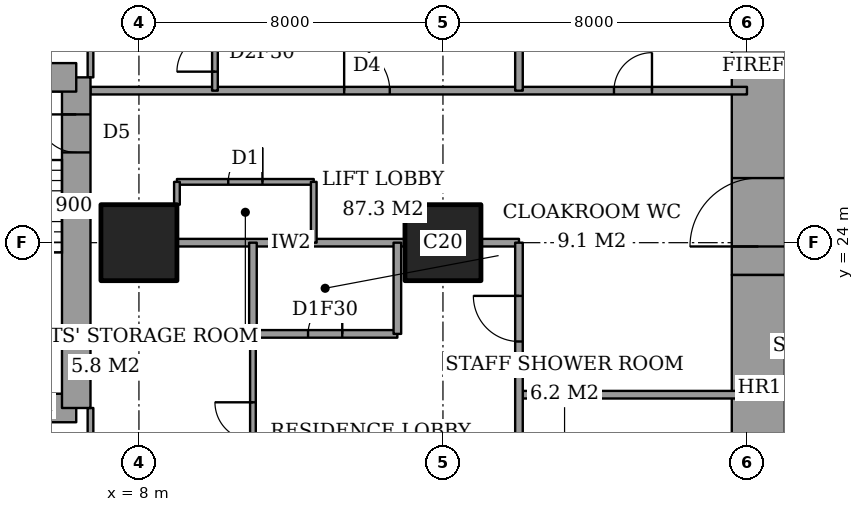
"""IFC4 building model, lengths in metres.
Left out: names, types, materials, properties, quantities, classifications, styles, units other than length and angle.
Written with IfcOpenShell. Run it as: python <this file> out.ifc"""

import sys

from ifc_helpers import new_model, si_unit, direction, frame, frame_2d, origin, origin_2d, place, context, subcontext, project, spatial, rectangle, extrude, element, fill, save


model = new_model("IFC4")
c1 = context("Model", 3, precision=1e-05, world=origin(), true_north=direction((0.0, 1.0)))
c2 = subcontext(c1, "Body", "Model", "MODEL_VIEW")
j1 = project(units=[si_unit("LENGTHUNIT", "METRE"), si_unit("PLANEANGLEUNIT", "RADIAN")], contexts=[c1])
p1 = place(None, origin())
s1 = spatial("IfcSite", under=j1, at=p1, CompositionType="ELEMENT")
p2 = place(p1, origin())
s2 = spatial("IfcBuilding", under=s1, at=p2, CompositionType="ELEMENT")
p3 = place(p2, frame((0.0, 0.0, 96.2)))
s3 = spatial("IfcBuildingStorey", under=s2, at=p3, CompositionType="ELEMENT", Elevation=96.2)
for number, where, z_axis, x_axis in (
    (1, (8.0, 24.0, 0.0), (0.0, 0.0, 1.0), (1.0, 0.0, 0.0)),
    (2, (16.0, 24.0, 0.0), (0.0, 0.0, 1.0), (1.0, 0.0, 0.0)),
):
    element("IfcColumn", number, at=place(p3, frame(where, z_axis=z_axis, x_axis=x_axis)), inside=s3, PredefinedType="COLUMN", context=c2, shape_type="SweptSolid", body=[
        extrude(rectangle(XDim=2.0, YDim=2.0, at=origin_2d()), origin(), (0.0, 0.0, 1.0), 3.6),
    ])
p4 = place(p3, frame((24.3, 13.0, 0.0), z_axis=(0.0, 0.0, 1.0), x_axis=(0.0, 1.0, 0.0)))
e3 = element("IfcWall", 3, at=p4, inside=s3, PredefinedType="SHEAR", context=c2, shape_type="SweptSolid", body=[
    extrude(rectangle(XDim=10.15, YDim=1.4, at=frame_2d((5.075, 0.0))), origin(), (0.0, 0.0, 1.0), 3.6),
])
p5 = place(p3, frame((24.3, 23.15, 0.0), z_axis=(0.0, 0.0, 1.0), x_axis=(0.0, 1.0, 0.0)))
e4 = element("IfcWall", 4, at=p5, inside=s3, PredefinedType="SHEAR", context=c2, shape_type="SweptSolid", body=[
    extrude(rectangle(XDim=11.85, YDim=1.4, at=frame_2d((5.925, 0.0))), origin(), (0.0, 0.0, 1.0), 3.6),
])
p6 = place(p5, frame((0.75, 0.0, 0.0)))
e5 = element("IfcOpeningElement", 5, at=p6, cuts=e4, PredefinedType="OPENING", context=c2, shape_type="SweptSolid", body=[
    extrude(rectangle(XDim=1.8, YDim=2.4, at=frame_2d((0.9, 1.2))), frame((0.0, 0.71, 0.0), z_axis=(0.0, -1.0, 0.0), x_axis=(1.0, 0.0, 0.0)), (0.0, 0.0, 1.0), 1.42),
])
p7 = place(p3, frame((1.9, 19.65, 0.0), z_axis=(0.0, 0.0, 1.0), x_axis=(1.0, 0.0, 0.0)))
e6 = element("IfcWall", 6, at=p7, inside=s3, PredefinedType="SHEAR", context=c2, shape_type="SweptSolid", body=[
    extrude(rectangle(XDim=4.45, YDim=0.75, at=frame_2d((2.225, 0.0))), origin(), (0.0, 0.0, 1.0), 3.6),
])
p8 = place(p3, frame((6.35, 19.65, 0.0), z_axis=(0.0, 0.0, 1.0), x_axis=(0.0, 1.0, 0.0)))
e7 = element("IfcWall", 7, at=p8, inside=s3, PredefinedType="SHEAR", context=c2, shape_type="SweptSolid", body=[
    extrude(rectangle(XDim=8.7, YDim=0.75, at=frame_2d((4.35, 0.0))), origin(), (0.0, 0.0, 1.0), 3.6),
])
p9 = place(p8, frame((6.725, 0.0, 0.0)))
e8 = element("IfcOpeningElement", 8, at=p9, cuts=e7, PredefinedType="OPENING", context=c2, shape_type="SweptSolid", body=[
    extrude(rectangle(XDim=1.0, YDim=2.1, at=frame_2d((0.5, 1.05))), frame((0.0, 0.385, 0.0), z_axis=(0.0, -1.0, 0.0), x_axis=(1.0, 0.0, 0.0)), (0.0, 0.0, 1.0), 0.77),
])
p10 = place(p3, frame((6.35, 28.35, 0.0), z_axis=(0.0, 0.0, 1.0), x_axis=(-1.0, 0.0, 0.0)))
e9 = element("IfcWall", 9, at=p10, inside=s3, PredefinedType="SHEAR", context=c2, shape_type="SweptSolid", body=[
    extrude(rectangle(XDim=4.45, YDim=0.75, at=frame_2d((2.225, 0.0))), origin(), (0.0, 0.0, 1.0), 3.6),
])
p11 = place(p3, frame((18.0, 20.0, 0.0), z_axis=(0.0, 0.0, 1.0), x_axis=(1.0, 0.0, 0.0)))
e10 = element("IfcWall", 10, at=p11, inside=s3, PredefinedType="PARTITIONING", context=c2, shape_type="SweptSolid", body=[
    extrude(rectangle(XDim=6.0, YDim=0.2, at=frame_2d((3.0, 0.0))), origin(), (0.0, 0.0, 1.0), 3.35),
])
p12 = place(p3, frame((11.0, 21.6, 0.0), z_axis=(0.0, 0.0, 1.0), x_axis=(1.0, 0.0, 0.0)))
e11 = element("IfcWall", 11, at=p12, inside=s3, PredefinedType="PARTITIONING", context=c2, shape_type="SweptSolid", body=[
    extrude(rectangle(XDim=3.8, YDim=0.2, at=frame_2d((1.9, 0.0))), origin(), (0.0, 0.0, 1.0), 3.35),
])
p13 = place(p12, frame((1.45, 0.0, 0.0)))
e12 = element("IfcOpeningElement", 12, at=p13, cuts=e11, PredefinedType="OPENING", context=c2, shape_type="SweptSolid", body=[
    extrude(rectangle(XDim=0.9, YDim=2.1, at=frame_2d((0.45, 1.05))), frame((0.0, 0.11, 0.0), z_axis=(0.0, -1.0, 0.0), x_axis=(1.0, 0.0, 0.0)), (0.0, 0.0, 1.0), 0.22),
])
p14 = place(p3, frame((9.0, 24.0, 0.0), z_axis=(0.0, 0.0, 1.0), x_axis=(1.0, 0.0, 0.0)))
e13 = element("IfcWall", 13, at=p14, inside=s3, PredefinedType="PARTITIONING", context=c2, shape_type="SweptSolid", body=[
    extrude(rectangle(XDim=6.0, YDim=0.2, at=frame_2d((3.0, 0.0))), origin(), (0.0, 0.0, 1.0), 3.35),
])
p15 = place(p3, frame((17.0, 24.0, 0.0), z_axis=(0.0, 0.0, 1.0), x_axis=(1.0, 0.0, 0.0)))
e14 = element("IfcWall", 14, at=p15, inside=s3, PredefinedType="PARTITIONING", context=c2, shape_type="SweptSolid", body=[
    extrude(rectangle(XDim=1.0, YDim=0.2, at=frame_2d((0.5, 0.0))), origin(), (0.0, 0.0, 1.0), 3.35),
])
p16 = place(p3, frame((9.0, 25.6, 0.0), z_axis=(0.0, 0.0, 1.0), x_axis=(1.0, 0.0, 0.0)))
e15 = element("IfcWall", 15, at=p16, inside=s3, PredefinedType="PARTITIONING", context=c2, shape_type="SweptSolid", body=[
    extrude(rectangle(XDim=3.6, YDim=0.15, at=frame_2d((1.8, 0.0))), origin(), (0.0, 0.0, 1.0), 3.35),
])
p17 = place(p16, frame((1.35, 0.0, 0.0)))
e16 = element("IfcOpeningElement", 16, at=p17, cuts=e15, PredefinedType="OPENING", context=c2, shape_type="SweptSolid", body=[
    extrude(rectangle(XDim=0.9, YDim=2.1, at=frame_2d((0.45, 1.05))), frame((0.0, 0.085, 0.0), z_axis=(0.0, -1.0, 0.0), x_axis=(1.0, 0.0, 0.0)), (0.0, 0.0, 1.0), 0.17),
])
p18 = place(p3, frame((6.725, 28.0, 0.0), z_axis=(0.0, 0.0, 1.0), x_axis=(1.0, 0.0, 0.0)))
e17 = element("IfcWall", 17, at=p18, inside=s3, PredefinedType="PARTITIONING", context=c2, shape_type="SweptSolid", body=[
    extrude(rectangle(XDim=17.275, YDim=0.2, at=frame_2d((8.637, 0.0))), origin(), (0.0, 0.0, 1.0), 3.35),
])
p19 = place(p18, frame((6.675, 0.0, 0.0)))
e18 = element("IfcOpeningElement", 18, at=p19, cuts=e17, PredefinedType="OPENING", context=c2, shape_type="SweptSolid", body=[
    extrude(rectangle(XDim=1.2, YDim=2.4, at=frame_2d((0.6, 1.2))), frame((0.0, 0.11, 0.0), z_axis=(0.0, -1.0, 0.0), x_axis=(1.0, 0.0, 0.0)), (0.0, 0.0, 1.0), 0.22),
])
p20 = place(p18, frame((13.775, 0.0, 0.0)))
e19 = element("IfcOpeningElement", 19, at=p20, cuts=e17, PredefinedType="OPENING", context=c2, shape_type="SweptSolid", body=[
    extrude(rectangle(XDim=1.0, YDim=2.1, at=frame_2d((0.5, 1.05))), frame((0.0, 0.11, 0.0), z_axis=(0.0, -1.0, 0.0), x_axis=(1.0, 0.0, 0.0)), (0.0, 0.0, 1.0), 0.22),
])
p21 = place(p3, frame((6.725, 17.2, 0.0), z_axis=(0.0, 0.0, 1.0), x_axis=(0.0, 1.0, 0.0)))
e20 = element("IfcWall", 20, at=p21, inside=s3, PredefinedType="PARTITIONING", context=c2, shape_type="SweptSolid", body=[
    extrude(rectangle(XDim=2.45, YDim=0.15, at=frame_2d((1.225, 0.0))), origin(), (0.0, 0.0, 1.0), 3.35),
])
p22 = place(p21, frame((0.587, 0.0, 0.0)))
e21 = element("IfcOpeningElement", 21, at=p22, cuts=e20, PredefinedType="OPENING", context=c2, shape_type="SweptSolid", body=[
    extrude(rectangle(XDim=0.9, YDim=2.1, at=frame_2d((0.45, 1.05))), frame((0.0, 0.085, 0.0), z_axis=(0.0, -1.0, 0.0), x_axis=(1.0, 0.0, 0.0)), (0.0, 0.0, 1.0), 0.17),
])
p23 = place(p3, frame((6.725, 28.35, 0.0), z_axis=(0.0, 0.0, 1.0), x_axis=(0.0, 1.0, 0.0)))
e22 = element("IfcWall", 22, at=p23, inside=s3, PredefinedType="PARTITIONING", context=c2, shape_type="SweptSolid", body=[
    extrude(rectangle(XDim=2.45, YDim=0.15, at=frame_2d((1.225, 0.0))), origin(), (0.0, 0.0, 1.0), 3.35),
])
p24 = place(p23, frame((0.913, 0.0, 0.0)))
e23 = element("IfcOpeningElement", 23, at=p24, cuts=e22, PredefinedType="OPENING", context=c2, shape_type="SweptSolid", body=[
    extrude(rectangle(XDim=1.0, YDim=2.1, at=frame_2d((0.5, 1.05))), frame((0.0, 0.085, 0.0), z_axis=(0.0, -1.0, 0.0), x_axis=(1.0, 0.0, 0.0)), (0.0, 0.0, 1.0), 0.17),
])
p25 = place(p3, frame((9.0, 25.0, 0.0), z_axis=(0.0, 0.0, 1.0), x_axis=(0.0, 1.0, 0.0)))
e24 = element("IfcWall", 24, at=p25, inside=s3, PredefinedType="PARTITIONING", context=c2, shape_type="SweptSolid", body=[
    extrude(rectangle(XDim=0.6, YDim=0.15, at=frame_2d((0.3, 0.0))), origin(), (0.0, 0.0, 1.0), 3.35),
])
p26 = place(p3, frame((10.0, 28.0, 0.0), z_axis=(0.0, 0.0, 1.0), x_axis=(0.0, 1.0, 0.0)))
e25 = element("IfcWall", 25, at=p26, inside=s3, PredefinedType="PARTITIONING", context=c2, shape_type="SweptSolid", body=[
    extrude(rectangle(XDim=9.4, YDim=0.15, at=frame_2d((4.7, 0.0))), origin(), (0.0, 0.0, 1.0), 3.35),
])
p27 = place(p26, frame((0.5, 0.0, 0.0)))
e26 = element("IfcOpeningElement", 26, at=p27, cuts=e25, PredefinedType="OPENING", context=c2, shape_type="SweptSolid", body=[
    extrude(rectangle(XDim=1.0, YDim=2.1, at=frame_2d((0.5, 1.05))), frame((0.0, 0.085, 0.0), z_axis=(0.0, -1.0, 0.0), x_axis=(1.0, 0.0, 0.0)), (0.0, 0.0, 1.0), 0.17),
])
p28 = place(p3, frame((11.0, 21.6, 0.0), z_axis=(0.0, 0.0, 1.0), x_axis=(0.0, 1.0, 0.0)))
e27 = element("IfcWall", 27, at=p28, inside=s3, PredefinedType="PARTITIONING", context=c2, shape_type="SweptSolid", body=[
    extrude(rectangle(XDim=2.4, YDim=0.2, at=frame_2d((1.2, 0.0))), origin(), (0.0, 0.0, 1.0), 3.35),
])
p29 = place(p3, frame((11.0, 10.8, 0.0), z_axis=(0.0, 0.0, 1.0), x_axis=(0.0, 1.0, 0.0)))
e28 = element("IfcWall", 28, at=p29, inside=s3, PredefinedType="PARTITIONING", context=c2, shape_type="SweptSolid", body=[
    extrude(rectangle(XDim=10.8, YDim=0.15, at=frame_2d((5.4, 0.0))), origin(), (0.0, 0.0, 1.0), 3.35),
])
p30 = place(p29, frame((8.0, 0.0, 0.0)))
e29 = element("IfcOpeningElement", 29, at=p30, cuts=e28, PredefinedType="OPENING", context=c2, shape_type="SweptSolid", body=[
    extrude(rectangle(XDim=1.0, YDim=2.1, at=frame_2d((0.5, 1.05))), frame((0.0, 0.085, 0.0), z_axis=(0.0, -1.0, 0.0), x_axis=(1.0, 0.0, 0.0)), (0.0, 0.0, 1.0), 0.17),
])
p31 = place(p3, frame((12.6, 24.0, 0.0), z_axis=(0.0, 0.0, 1.0), x_axis=(0.0, 1.0, 0.0)))
e30 = element("IfcWall", 30, at=p31, inside=s3, PredefinedType="PARTITIONING", context=c2, shape_type="SweptSolid", body=[
    extrude(rectangle(XDim=1.6, YDim=0.15, at=frame_2d((0.8, 0.0))), origin(), (0.0, 0.0, 1.0), 3.35),
])
p32 = place(p3, frame((14.8, 21.6, 0.0), z_axis=(0.0, 0.0, 1.0), x_axis=(0.0, 1.0, 0.0)))
e31 = element("IfcWall", 31, at=p32, inside=s3, PredefinedType="PARTITIONING", context=c2, shape_type="SweptSolid", body=[
    extrude(rectangle(XDim=2.4, YDim=0.2, at=frame_2d((1.2, 0.0))), origin(), (0.0, 0.0, 1.0), 3.35),
])
p33 = place(p3, frame((18.0, 17.0, 0.0), z_axis=(0.0, 0.0, 1.0), x_axis=(0.0, 1.0, 0.0)))
e32 = element("IfcWall", 32, at=p33, inside=s3, PredefinedType="PARTITIONING", context=c2, shape_type="SweptSolid", body=[
    extrude(rectangle(XDim=7.0, YDim=0.2, at=frame_2d((3.5, 0.0))), origin(), (0.0, 0.0, 1.0), 3.35),
])
p34 = place(p33, frame((4.4, 0.0, 0.0)))
e33 = element("IfcOpeningElement", 33, at=p34, cuts=e32, PredefinedType="OPENING", context=c2, shape_type="SweptSolid", body=[
    extrude(rectangle(XDim=1.2, YDim=2.4, at=frame_2d((0.6, 1.2))), frame((0.0, 0.11, 0.0), z_axis=(0.0, -1.0, 0.0), x_axis=(1.0, 0.0, 0.0)), (0.0, 0.0, 1.0), 0.22),
])
p35 = place(p33, frame((1.05, 0.0, 0.0)))
e34 = element("IfcOpeningElement", 34, at=p35, cuts=e32, PredefinedType="OPENING", context=c2, shape_type="SweptSolid", body=[
    extrude(rectangle(XDim=0.9, YDim=2.1, at=frame_2d((0.45, 1.05))), frame((0.0, 0.11, 0.0), z_axis=(0.0, -1.0, 0.0), x_axis=(1.0, 0.0, 0.0)), (0.0, 0.0, 1.0), 0.22),
])
p36 = place(p3, frame((18.0, 28.0, 0.0), z_axis=(0.0, 0.0, 1.0), x_axis=(0.0, 1.0, 0.0)))
e35 = element("IfcWall", 35, at=p36, inside=s3, PredefinedType="PARTITIONING", context=c2, shape_type="SweptSolid", body=[
    extrude(rectangle(XDim=10.2, YDim=0.2, at=frame_2d((5.1, 0.0))), origin(), (0.0, 0.0, 1.0), 3.35),
])
p37 = place(p30, origin())
e36 = element("IfcDoor", 36, at=p37, inside=s3, OperationType="SINGLE_SWING_LEFT", PredefinedType="DOOR", context=c2, shape_type="SweptSolid", body=[
    extrude(rectangle(XDim=1.0, YDim=2.1, at=frame_2d((0.5, 1.05))), frame((0.0, 0.025, 0.0), z_axis=(0.0, -1.0, 0.0), x_axis=(1.0, 0.0, 0.0)), (0.0, 0.0, 1.0), 0.05),
])
fill(e29, e36)
p38 = place(p13, origin())
e37 = element("IfcDoor", 37, at=p38, inside=s3, OperationType="SINGLE_SWING_LEFT", PredefinedType="DOOR", context=c2, shape_type="SweptSolid", body=[
    extrude(rectangle(XDim=0.9, YDim=2.1, at=frame_2d((0.45, 1.05))), frame((0.0, 0.025, 0.0), z_axis=(0.0, -1.0, 0.0), x_axis=(1.0, 0.0, 0.0)), (0.0, 0.0, 1.0), 0.05),
])
fill(e12, e37)
p39 = place(p34, origin())
e38 = element("IfcDoor", 38, at=p39, inside=s3, OperationType="SINGLE_SWING_LEFT", PredefinedType="DOOR", context=c2, shape_type="SweptSolid", body=[
    extrude(rectangle(XDim=1.2, YDim=2.4, at=frame_2d((0.6, 1.2))), frame((0.0, 0.025, 0.0), z_axis=(0.0, -1.0, 0.0), x_axis=(1.0, 0.0, 0.0)), (0.0, 0.0, 1.0), 0.05),
])
fill(e33, e38)
p40 = place(p27, origin())
e39 = element("IfcDoor", 39, at=p40, inside=s3, OperationType="SINGLE_SWING_RIGHT", PredefinedType="DOOR", context=c2, shape_type="SweptSolid", body=[
    extrude(rectangle(XDim=1.0, YDim=2.1, at=frame_2d((0.5, 1.05))), frame((0.0, 0.025, 0.0), z_axis=(0.0, -1.0, 0.0), x_axis=(1.0, 0.0, 0.0)), (0.0, 0.0, 1.0), 0.05),
])
fill(e26, e39)
p41 = place(p19, origin())
e40 = element("IfcDoor", 40, at=p41, inside=s3, OperationType="SINGLE_SWING_RIGHT", PredefinedType="DOOR", context=c2, shape_type="SweptSolid", body=[
    extrude(rectangle(XDim=1.2, YDim=2.4, at=frame_2d((0.6, 1.2))), frame((0.0, 0.025, 0.0), z_axis=(0.0, -1.0, 0.0), x_axis=(1.0, 0.0, 0.0)), (0.0, 0.0, 1.0), 0.05),
])
fill(e18, e40)
p42 = place(p17, origin())
e41 = element("IfcDoor", 41, at=p42, inside=s3, OperationType="SINGLE_SWING_LEFT", PredefinedType="DOOR", context=c2, shape_type="SweptSolid", body=[
    extrude(rectangle(XDim=0.9, YDim=2.1, at=frame_2d((0.45, 1.05))), frame((0.0, 0.025, 0.0), z_axis=(0.0, -1.0, 0.0), x_axis=(1.0, 0.0, 0.0)), (0.0, 0.0, 1.0), 0.05),
])
fill(e16, e41)
p43 = place(p20, origin())
e42 = element("IfcDoor", 42, at=p43, inside=s3, OperationType="SINGLE_SWING_LEFT", PredefinedType="DOOR", context=c2, shape_type="SweptSolid", body=[
    extrude(rectangle(XDim=1.0, YDim=2.1, at=frame_2d((0.5, 1.05))), frame((0.0, 0.025, 0.0), z_axis=(0.0, -1.0, 0.0), x_axis=(1.0, 0.0, 0.0)), (0.0, 0.0, 1.0), 0.05),
])
fill(e19, e42)
p44 = place(p6, origin())
e43 = element("IfcDoor", 43, at=p44, inside=s3, OperationType="DOUBLE_DOOR_DOUBLE_SWING", PredefinedType="DOOR", context=c2, shape_type="SweptSolid", body=[
    extrude(rectangle(XDim=1.8, YDim=2.4, at=frame_2d((0.9, 1.2))), frame((0.0, 0.025, 0.0), z_axis=(0.0, -1.0, 0.0), x_axis=(1.0, 0.0, 0.0)), (0.0, 0.0, 1.0), 0.05),
])
fill(e5, e43)
p45 = place(p9, origin())
e44 = element("IfcDoor", 44, at=p45, inside=s3, OperationType="SINGLE_SWING_LEFT", PredefinedType="DOOR", context=c2, shape_type="SweptSolid", body=[
    extrude(rectangle(XDim=1.0, YDim=2.1, at=frame_2d((0.5, 1.05))), frame((0.0, 0.025, 0.0), z_axis=(0.0, -1.0, 0.0), x_axis=(1.0, 0.0, 0.0)), (0.0, 0.0, 1.0), 0.05),
])
fill(e8, e44)
save(model, sys.argv[1])
